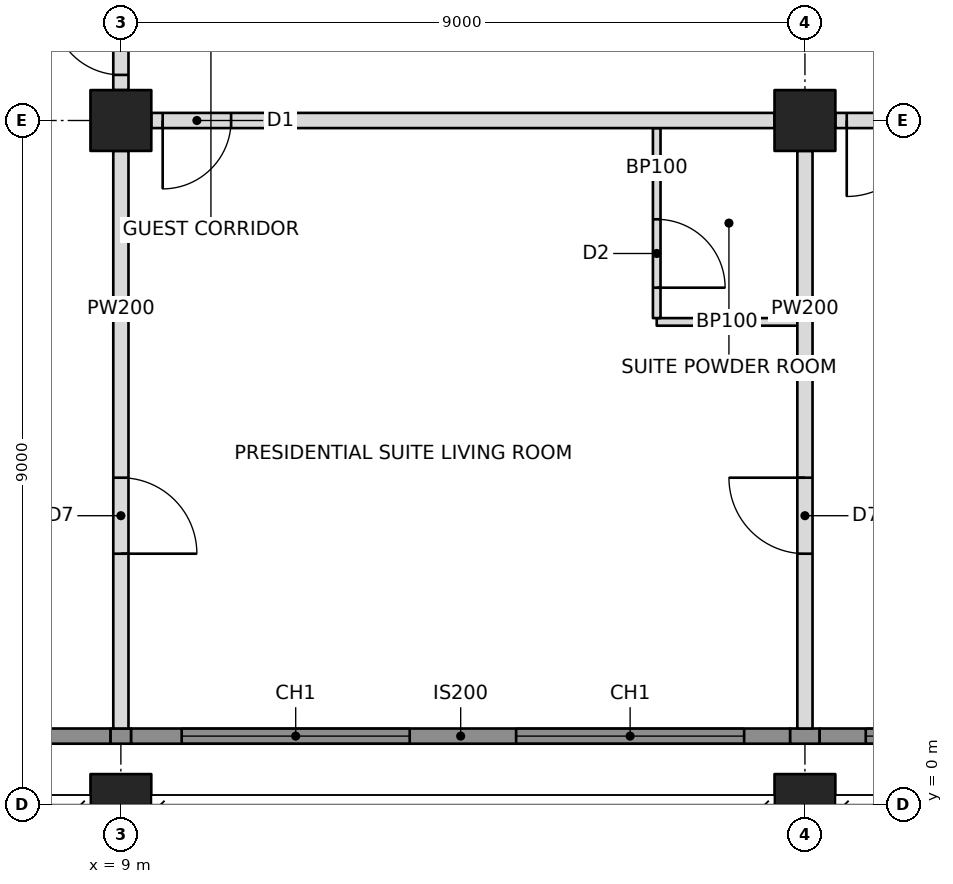
"""IFC4 building model, lengths in metres.
Left out: names, types, materials, properties, quantities, classifications, styles, units other than length and angle.
Written with IfcOpenShell. Run it as: python <this file> out.ifc"""

import sys

from ifc_helpers import new_model, si_unit, direction, frame, frame_2d, origin, origin_2d, place, context, subcontext, project, spatial, rectangle, hollow_rectangle, extrude, element, fill, save


model = new_model("IFC4")
c1 = context("Model", 3, precision=1e-05, world=origin(), true_north=direction((0.0, 1.0)))
c2 = subcontext(c1, "Body", "Model", "MODEL_VIEW")
j1 = project(units=[si_unit("LENGTHUNIT", "METRE"), si_unit("PLANEANGLEUNIT", "RADIAN")], contexts=[c1])
p1 = place(None, origin())
s1 = spatial("IfcSite", under=j1, at=p1, CompositionType="ELEMENT")
p2 = place(p1, origin())
s2 = spatial("IfcBuilding", under=s1, at=p2, CompositionType="ELEMENT")
p3 = place(p2, frame((0.0, 0.0, 262.6)))
s3 = spatial("IfcBuildingStorey", under=s2, at=p3, CompositionType="ELEMENT", Elevation=262.6)
for number, where, z_axis, x_axis in (
    (1, (9.0, 0.0, 0.0), (0.0, 0.0, 1.0), (1.0, 0.0, 0.0)),
    (2, (9.0, 9.0, 0.0), (0.0, 0.0, 1.0), (1.0, 0.0, 0.0)),
    (3, (18.0, 0.0, 0.0), (0.0, 0.0, 1.0), (1.0, 0.0, 0.0)),
    (4, (18.0, 9.0, 0.0), (0.0, 0.0, 1.0), (1.0, 0.0, 0.0)),
):
    element("IfcColumn", number, at=place(p3, frame(where, z_axis=z_axis, x_axis=x_axis)), inside=s3, PredefinedType="COLUMN", context=c2, shape_type="SweptSolid", body=[
        extrude(hollow_rectangle(XDim=0.8, YDim=0.8, WallThickness=0.032, at=origin_2d()), origin(), (0.0, 0.0, 1.0), 3.6),
    ])
p4 = place(p3, frame((3.0, 0.9, 0.0), z_axis=(0.0, 0.0, 1.0), x_axis=(1.0, 0.0, 0.0)))
e5 = element("IfcWall", 5, at=p4, inside=s3, PredefinedType="SOLIDWALL", context=c2, shape_type="SweptSolid", body=[
    extrude(rectangle(XDim=5.865, YDim=0.2, at=frame_2d((2.932, 0.0))), origin(), (0.0, 0.0, 1.0), 3.4),
])
p5 = place(p4, frame((1.45, 0.0, 0.6)))
e6 = element("IfcOpeningElement", 6, at=p5, cuts=e5, PredefinedType="OPENING", context=c2, shape_type="SweptSolid", body=[
    extrude(rectangle(XDim=3.0, YDim=2.2, at=frame_2d((1.5, 1.1))), frame((0.0, 0.11, 0.0), z_axis=(0.0, -1.0, 0.0), x_axis=(1.0, 0.0, 0.0)), (0.0, 0.0, 1.0), 0.22),
])
p6 = place(p3, frame((9.4, 9.0, 0.0), z_axis=(0.0, 0.0, 1.0), x_axis=(1.0, 0.0, 0.0)))
e7 = element("IfcWall", 7, at=p6, inside=s3, PredefinedType="PARTITIONING", context=c2, shape_type="SweptSolid", body=[
    extrude(rectangle(XDim=8.2, YDim=0.2, at=frame_2d((4.1, 0.0))), origin(), (0.0, 0.0, 1.0), 2.605),
])
p7 = place(p6, frame((0.15, 0.0, 0.0)))
e8 = element("IfcOpeningElement", 8, at=p7, cuts=e7, PredefinedType="OPENING", context=c2, shape_type="SweptSolid", body=[
    extrude(rectangle(XDim=0.9, YDim=2.1, at=frame_2d((0.45, 1.05))), frame((0.0, 0.11, 0.0), z_axis=(0.0, -1.0, 0.0), x_axis=(1.0, 0.0, 0.0)), (0.0, 0.0, 1.0), 0.22),
])
p8 = place(p3, frame((18.4, 9.0, 0.0), z_axis=(0.0, 0.0, 1.0), x_axis=(1.0, 0.0, 0.0)))
e9 = element("IfcWall", 9, at=p8, inside=s3, PredefinedType="PARTITIONING", context=c2, shape_type="SweptSolid", body=[
    extrude(rectangle(XDim=8.2, YDim=0.2, at=frame_2d((4.1, 0.0))), origin(), (0.0, 0.0, 1.0), 2.605),
])
p9 = place(p8, frame((0.15, 0.0, 0.0)))
e10 = element("IfcOpeningElement", 10, at=p9, cuts=e9, PredefinedType="OPENING", context=c2, shape_type="SweptSolid", body=[
    extrude(rectangle(XDim=1.0, YDim=2.1, at=frame_2d((0.5, 1.05))), frame((0.0, 0.11, 0.0), z_axis=(0.0, -1.0, 0.0), x_axis=(1.0, 0.0, 0.0)), (0.0, 0.0, 1.0), 0.22),
])
p10 = place(p3, frame((9.0, 8.6, 0.0), z_axis=(0.0, 0.0, 1.0), x_axis=(0.0, -1.0, 0.0)))
e11 = element("IfcWall", 11, at=p10, inside=s3, PredefinedType="PARTITIONING", context=c2, shape_type="SweptSolid", body=[
    extrude(rectangle(XDim=7.6, YDim=0.2, at=frame_2d((3.8, 0.0))), origin(), (0.0, 0.0, 1.0), 2.638),
])
p11 = place(p10, frame((4.3, 0.0, 0.0)))
e12 = element("IfcOpeningElement", 12, at=p11, cuts=e11, PredefinedType="OPENING", context=c2, shape_type="SweptSolid", body=[
    extrude(rectangle(XDim=1.0, YDim=2.1, at=frame_2d((0.5, 1.05))), frame((0.0, 0.11, 0.0), z_axis=(0.0, -1.0, 0.0), x_axis=(1.0, 0.0, 0.0)), (0.0, 0.0, 1.0), 0.22),
])
p12 = place(p3, frame((18.0, 8.6, 0.0), z_axis=(0.0, 0.0, 1.0), x_axis=(0.0, -1.0, 0.0)))
e13 = element("IfcWall", 13, at=p12, inside=s3, PredefinedType="PARTITIONING", context=c2, shape_type="SweptSolid", body=[
    extrude(rectangle(XDim=7.6, YDim=0.2, at=frame_2d((3.8, 0.0))), origin(), (0.0, 0.0, 1.0), 2.605),
])
p13 = place(p12, frame((4.3, 0.0, 0.0)))
e14 = element("IfcOpeningElement", 14, at=p13, cuts=e13, PredefinedType="OPENING", context=c2, shape_type="SweptSolid", body=[
    extrude(rectangle(XDim=1.0, YDim=2.1, at=frame_2d((0.5, 1.05))), frame((0.0, 0.11, 0.0), z_axis=(0.0, -1.0, 0.0), x_axis=(1.0, 0.0, 0.0)), (0.0, 0.0, 1.0), 0.22),
])
p14 = place(p3, frame((16.05, 6.35, 0.0), z_axis=(0.0, 0.0, 1.0), x_axis=(1.0, 0.0, 0.0)))
e15 = element("IfcWall", 15, at=p14, inside=s3, PredefinedType="PARTITIONING", context=c2, shape_type="SweptSolid", body=[
    extrude(rectangle(XDim=1.85, YDim=0.1, at=frame_2d((0.925, 0.0))), origin(), (0.0, 0.0, 1.0), 2.604),
])
p15 = place(p3, frame((16.05, 8.9, 0.0), z_axis=(0.0, 0.0, 1.0), x_axis=(0.0, -1.0, 0.0)))
e16 = element("IfcWall", 16, at=p15, inside=s3, PredefinedType="PARTITIONING", context=c2, shape_type="SweptSolid", body=[
    extrude(rectangle(XDim=2.5, YDim=0.1, at=frame_2d((1.25, 0.0))), origin(), (0.0, 0.0, 1.0), 2.604),
])
p16 = place(p15, frame((1.2, 0.0, 0.0)))
e17 = element("IfcOpeningElement", 17, at=p16, cuts=e16, PredefinedType="OPENING", context=c2, shape_type="SweptSolid", body=[
    extrude(rectangle(XDim=0.9, YDim=2.1, at=frame_2d((0.45, 1.05))), frame((0.0, 0.06, 0.0), z_axis=(0.0, -1.0, 0.0), x_axis=(1.0, 0.0, 0.0)), (0.0, 0.0, 1.0), 0.12),
])
p17 = place(p3, frame((9.0, 9.4, 0.0), z_axis=(0.0, 0.0, 1.0), x_axis=(0.0, 1.0, 0.0)))
e18 = element("IfcWall", 18, at=p17, inside=s3, PredefinedType="PARTITIONING", context=c2, shape_type="SweptSolid", body=[
    extrude(rectangle(XDim=1.3, YDim=0.2, at=frame_2d((0.65, 0.0))), origin(), (0.0, 0.0, 1.0), 2.605),
])
p18 = place(p17, frame((0.2, 0.0, 0.0)))
e19 = element("IfcOpeningElement", 19, at=p18, cuts=e18, PredefinedType="OPENING", context=c2, shape_type="SweptSolid", body=[
    extrude(rectangle(XDim=0.9, YDim=2.1, at=frame_2d((0.45, 1.05))), frame((0.0, 0.11, 0.0), z_axis=(0.0, -1.0, 0.0), x_axis=(1.0, 0.0, 0.0)), (0.0, 0.0, 1.0), 0.22),
])
p19 = place(p3, frame((8.865, 0.9, 0.0), z_axis=(0.0, 0.0, 1.0), x_axis=(1.0, 0.0, 0.0)))
e20 = element("IfcWall", 20, at=p19, inside=s3, PredefinedType="SOLIDWALL", context=c2, shape_type="SweptSolid", body=[
    extrude(rectangle(XDim=0.271, YDim=0.2, at=frame_2d((0.135, 0.0))), origin(), (0.0, 0.0, 1.0), 2.638),
])
p20 = place(p3, frame((9.135, 0.9, 0.0), z_axis=(0.0, 0.0, 1.0), x_axis=(1.0, 0.0, 0.0)))
e21 = element("IfcWall", 21, at=p20, inside=s3, PredefinedType="SOLIDWALL", context=c2, shape_type="SweptSolid", body=[
    extrude(rectangle(XDim=8.671, YDim=0.2, at=frame_2d((4.335, 0.0))), origin(), (0.0, 0.0, 1.0), 3.4),
])
p21 = place(p20, frame((0.665, 0.0, 0.6)))
e22 = element("IfcOpeningElement", 22, at=p21, cuts=e21, PredefinedType="OPENING", context=c2, shape_type="SweptSolid", body=[
    extrude(rectangle(XDim=3.0, YDim=2.2, at=frame_2d((1.5, 1.1))), frame((0.0, 0.11, 0.0), z_axis=(0.0, -1.0, 0.0), x_axis=(1.0, 0.0, 0.0)), (0.0, 0.0, 1.0), 0.22),
])
p22 = place(p20, frame((5.065, 0.0, 0.6)))
e23 = element("IfcOpeningElement", 23, at=p22, cuts=e21, PredefinedType="OPENING", context=c2, shape_type="SweptSolid", body=[
    extrude(rectangle(XDim=3.0, YDim=2.2, at=frame_2d((1.5, 1.1))), frame((0.0, 0.11, 0.0), z_axis=(0.0, -1.0, 0.0), x_axis=(1.0, 0.0, 0.0)), (0.0, 0.0, 1.0), 0.22),
])
p23 = place(p3, frame((17.806, 0.9, 0.0), z_axis=(0.0, 0.0, 1.0), x_axis=(1.0, 0.0, 0.0)))
e24 = element("IfcWall", 24, at=p23, inside=s3, PredefinedType="SOLIDWALL", context=c2, shape_type="SweptSolid", body=[
    extrude(rectangle(XDim=0.388, YDim=0.2, at=frame_2d((0.194, 0.0))), origin(), (0.0, 0.0, 1.0), 2.604),
])
p24 = place(p3, frame((18.194, 0.9, 0.0), z_axis=(0.0, 0.0, 1.0), x_axis=(1.0, 0.0, 0.0)))
e25 = element("IfcWall", 25, at=p24, inside=s3, PredefinedType="SOLIDWALL", context=c2, shape_type="SweptSolid", body=[
    extrude(rectangle(XDim=8.612, YDim=0.2, at=frame_2d((4.306, 0.0))), origin(), (0.0, 0.0, 1.0), 3.4),
])
p25 = place(p24, frame((0.606, 0.0, 0.6)))
e26 = element("IfcOpeningElement", 26, at=p25, cuts=e25, PredefinedType="OPENING", context=c2, shape_type="SweptSolid", body=[
    extrude(rectangle(XDim=3.0, YDim=2.2, at=frame_2d((1.5, 1.1))), frame((0.0, 0.11, 0.0), z_axis=(0.0, -1.0, 0.0), x_axis=(1.0, 0.0, 0.0)), (0.0, 0.0, 1.0), 0.22),
])
p26 = place(p24, frame((5.006, 0.0, 0.6)))
e27 = element("IfcOpeningElement", 27, at=p26, cuts=e25, PredefinedType="OPENING", context=c2, shape_type="SweptSolid", body=[
    extrude(rectangle(XDim=3.0, YDim=2.2, at=frame_2d((1.5, 1.1))), frame((0.0, 0.11, 0.0), z_axis=(0.0, -1.0, 0.0), x_axis=(1.0, 0.0, 0.0)), (0.0, 0.0, 1.0), 0.22),
])
p27 = place(p21, origin())
e28 = element("IfcWindow", 28, at=p27, inside=s3, PartitioningType="TRIPLE_PANEL_VERTICAL", PredefinedType="WINDOW", context=c2, shape_type="SweptSolid", body=[
    extrude(rectangle(XDim=3.0, YDim=2.2, at=frame_2d((1.5, 1.1))), frame((0.0, 0.03, 0.0), z_axis=(0.0, -1.0, 0.0), x_axis=(1.0, 0.0, 0.0)), (0.0, 0.0, 1.0), 0.06),
])
fill(e22, e28)
p28 = place(p22, origin())
e29 = element("IfcWindow", 29, at=p28, inside=s3, PartitioningType="TRIPLE_PANEL_VERTICAL", PredefinedType="WINDOW", context=c2, shape_type="SweptSolid", body=[
    extrude(rectangle(XDim=3.0, YDim=2.2, at=frame_2d((1.5, 1.1))), frame((0.0, 0.03, 0.0), z_axis=(0.0, -1.0, 0.0), x_axis=(1.0, 0.0, 0.0)), (0.0, 0.0, 1.0), 0.06),
])
fill(e23, e29)
p29 = place(p25, origin())
e30 = element("IfcWindow", 30, at=p29, inside=s3, PartitioningType="TRIPLE_PANEL_VERTICAL", PredefinedType="WINDOW", context=c2, shape_type="SweptSolid", body=[
    extrude(rectangle(XDim=3.0, YDim=2.2, at=frame_2d((1.5, 1.1))), frame((0.0, 0.03, 0.0), z_axis=(0.0, -1.0, 0.0), x_axis=(1.0, 0.0, 0.0)), (0.0, 0.0, 1.0), 0.06),
])
fill(e26, e30)
p30 = place(p11, origin())
e31 = element("IfcDoor", 31, at=p30, inside=s3, OperationType="SINGLE_SWING_RIGHT", PredefinedType="DOOR", context=c2, shape_type="SweptSolid", body=[
    extrude(rectangle(XDim=1.0, YDim=2.1, at=frame_2d((0.5, 1.05))), frame((0.0, 0.025, 0.0), z_axis=(0.0, -1.0, 0.0), x_axis=(1.0, 0.0, 0.0)), (0.0, 0.0, 1.0), 0.05),
])
fill(e12, e31)
p31 = place(p13, frame((1.0, 0.0, 0.0), z_axis=(0.0, 0.0, 1.0), x_axis=(-1.0, 0.0, 0.0)))
e32 = element("IfcDoor", 32, at=p31, inside=s3, OperationType="SINGLE_SWING_RIGHT", PredefinedType="DOOR", context=c2, shape_type="SweptSolid", body=[
    extrude(rectangle(XDim=1.0, YDim=2.1, at=frame_2d((0.5, 1.05))), frame((0.0, 0.025, 0.0), z_axis=(0.0, -1.0, 0.0), x_axis=(1.0, 0.0, 0.0)), (0.0, 0.0, 1.0), 0.05),
])
fill(e14, e32)
p32 = place(p16, origin())
e33 = element("IfcDoor", 33, at=p32, inside=s3, OperationType="SINGLE_SWING_RIGHT", PredefinedType="DOOR", context=c2, shape_type="SweptSolid", body=[
    extrude(rectangle(XDim=0.9, YDim=2.1, at=frame_2d((0.45, 1.05))), frame((0.0, 0.025, 0.0), z_axis=(0.0, -1.0, 0.0), x_axis=(1.0, 0.0, 0.0)), (0.0, 0.0, 1.0), 0.05),
])
fill(e17, e33)
p33 = place(p7, frame((0.9, 0.0, 0.0), z_axis=(0.0, 0.0, 1.0), x_axis=(-1.0, 0.0, 0.0)))
e34 = element("IfcDoor", 34, at=p33, inside=s3, OperationType="SINGLE_SWING_RIGHT", PredefinedType="DOOR", context=c2, shape_type="SweptSolid", body=[
    extrude(rectangle(XDim=0.9, YDim=2.1, at=frame_2d((0.45, 1.05))), frame((0.0, 0.025, 0.0), z_axis=(0.0, -1.0, 0.0), x_axis=(1.0, 0.0, 0.0)), (0.0, 0.0, 1.0), 0.05),
])
fill(e8, e34)
p34 = place(p9, frame((1.0, 0.0, 0.0), z_axis=(0.0, 0.0, 1.0), x_axis=(-1.0, 0.0, 0.0)))
e35 = element("IfcDoor", 35, at=p34, inside=s3, OperationType="SINGLE_SWING_RIGHT", PredefinedType="DOOR", context=c2, shape_type="SweptSolid", body=[
    extrude(rectangle(XDim=1.0, YDim=2.1, at=frame_2d((0.5, 1.05))), frame((0.0, 0.025, 0.0), z_axis=(0.0, -1.0, 0.0), x_axis=(1.0, 0.0, 0.0)), (0.0, 0.0, 1.0), 0.05),
])
fill(e10, e35)
p35 = place(p18, origin())
e36 = element("IfcDoor", 36, at=p35, inside=s3, OperationType="SINGLE_SWING_RIGHT", PredefinedType="DOOR", context=c2, shape_type="SweptSolid", body=[
    extrude(rectangle(XDim=0.9, YDim=2.1, at=frame_2d((0.45, 1.05))), frame((0.0, 0.025, 0.0), z_axis=(0.0, -1.0, 0.0), x_axis=(1.0, 0.0, 0.0)), (0.0, 0.0, 1.0), 0.05),
])
fill(e19, e36)
save(model, sys.argv[1])
